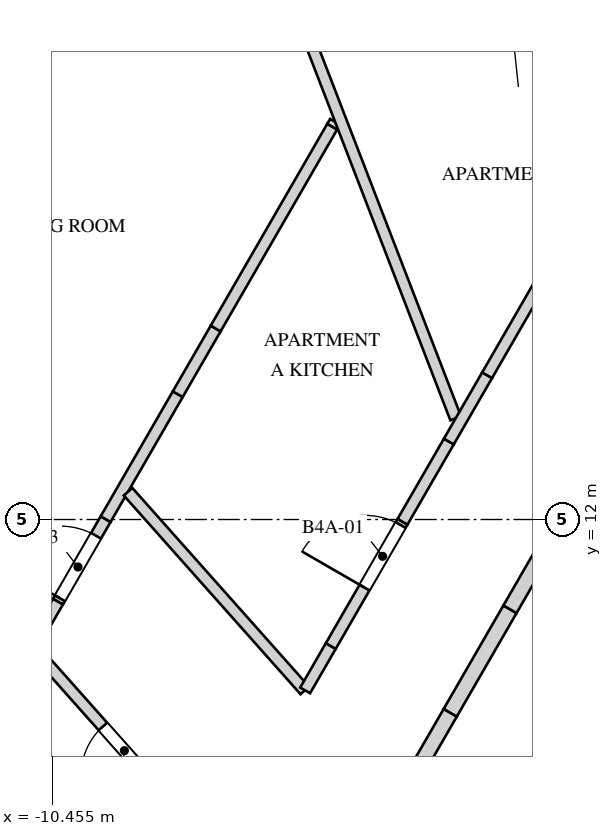
"""IFC4 building model, lengths in metres.
Left out: names, types, materials, properties, quantities, classifications, styles, units other than length and angle.
Written with IfcOpenShell. Run it as: python <this file> out.ifc"""

import sys

from ifc_helpers import new_model, si_unit, direction, frame, frame_2d, origin, place, context, subcontext, project, spatial, polyline, rectangle, outline, extrude, element, fill, save


model = new_model("IFC4")
c1 = context("Model", 3, precision=1e-05, world=origin(), true_north=direction((0.0, 1.0)))
c2 = subcontext(c1, "Body", "Model", "MODEL_VIEW")
j1 = project(units=[si_unit("LENGTHUNIT", "METRE"), si_unit("PLANEANGLEUNIT", "RADIAN")], contexts=[c1])
p1 = place(None, origin())
s1 = spatial("IfcSite", under=j1, at=p1, CompositionType="ELEMENT")
p2 = place(p1, origin())
s2 = spatial("IfcBuilding", under=s1, at=p2, CompositionType="ELEMENT")
p3 = place(p2, frame((0.0, 0.0, 162.8)))
s3 = spatial("IfcBuildingStorey", under=s2, at=p3, CompositionType="ELEMENT", Elevation=162.8)
p4 = place(p3, frame((-1.198, 10.575, 0.0), z_axis=(0.0, 0.0, 1.0), x_axis=(-0.499995289315, -0.866028123483, 0.0)))
e1 = element("IfcWall", 1, at=p4, inside=s3, PredefinedType="SHEAR", context=c2, shape_type="SweptSolid", body=[
    extrude(rectangle(XDim=17.118, YDim=0.85, at=frame_2d((8.559, 0.0))), origin(), (0.0, 0.0, 1.0), 4.0),
])
p5 = place(p4, frame((6.764, 0.0, 0.0)))
e2 = element("IfcOpeningElement", 2, at=p5, cuts=e1, PredefinedType="OPENING", context=c2, shape_type="SweptSolid", body=[
    extrude(rectangle(XDim=1.0, YDim=2.4, at=frame_2d((0.5, 1.2))), frame((0.0, 0.435, 0.0), z_axis=(0.0, -1.0, 0.0), x_axis=(1.0, 0.0, 0.0)), (0.0, 0.0, 1.0), 0.87),
])
p6 = place(p4, frame((14.742, 0.0, 0.0)))
e3 = element("IfcOpeningElement", 3, at=p6, cuts=e1, PredefinedType="OPENING", context=c2, shape_type="SweptSolid", body=[
    extrude(rectangle(XDim=0.8, YDim=2.1, at=frame_2d((0.4, 1.05))), frame((0.0, 0.435, 0.0), z_axis=(0.0, -1.0, 0.0), x_axis=(1.0, 0.0, 0.0)), (0.0, 0.0, 1.0), 0.87),
])
p7 = place(p3, frame((-11.235, 9.44, 0.0), z_axis=(0.0, 0.0, 1.0), x_axis=(0.499977863513, 0.866038183914, 0.0)))
e4 = element("IfcWall", 4, at=p7, inside=s3, PredefinedType="PARTITIONING", context=c2, shape_type="SweptSolid", body=[
    extrude(rectangle(XDim=1.71, YDim=0.15, at=frame_2d((0.855, 0.0))), origin(), (0.0, 0.0, 1.0), 3.65),
])
p8 = place(p3, frame((-10.38, 10.921, 0.0), z_axis=(0.0, 0.0, 1.0), x_axis=(0.499998165157, 0.866026463129, 0.0)))
e5 = element("IfcWall", 5, at=p8, inside=s3, PredefinedType="PARTITIONING", context=c2, shape_type="SweptSolid", body=[
    extrude(outline(polyline([(0.0, 0.0), (1.252, 0.0), (1.252, 2.55), (0.325, 2.55), (0.325, 3.65), (0.0, 3.65), (0.0, 0.0)])), frame((0.0, 0.075, 0.0), z_axis=(0.0, -1.0, 0.0), x_axis=(1.0, 0.0, 0.0)), (0.0, 0.0, 1.0), 0.15),
])
p9 = place(p8, frame((0.05, 0.0, 0.0)))
e6 = element("IfcOpeningElement", 6, at=p9, cuts=e5, PredefinedType="OPENING", context=c2, shape_type="SweptSolid", body=[
    extrude(rectangle(XDim=0.95, YDim=2.4, at=frame_2d((0.475, 1.2))), frame((0.0, 0.085, 0.0), z_axis=(0.0, -1.0, 0.0), x_axis=(1.0, 0.0, 0.0)), (0.0, 0.0, 1.0), 0.17),
])
p10 = place(p3, frame((-9.754, 12.005, 0.0), z_axis=(0.0, 0.0, 1.0), x_axis=(0.499971120268, 0.866042076863, 0.0)))
e7 = element("IfcWall", 7, at=p10, inside=s3, PredefinedType="PARTITIONING", context=c2, shape_type="SweptSolid", body=[
    extrude(rectangle(XDim=1.898, YDim=0.15, at=frame_2d((0.949, 0.0))), origin(), (0.0, 0.0, 1.0), 3.65),
])
p11 = place(p3, frame((-8.805, 13.649, 0.0), z_axis=(0.0, 0.0, 1.0), x_axis=(0.499955472713, 0.866051110099, 0.0)))
e8 = element("IfcWall", 8, at=p11, inside=s3, PredefinedType="PARTITIONING", context=c2, shape_type="SweptSolid", body=[
    extrude(rectangle(XDim=0.998, YDim=0.15, at=frame_2d((0.499, 0.0))), origin(), (0.0, 0.0, 1.0), 2.55),
])
p12 = place(p3, frame((-8.307, 14.513, 0.0), z_axis=(0.0, 0.0, 1.0), x_axis=(0.500034855457, 0.866005279042, 0.0)))
e9 = element("IfcWall", 9, at=p12, inside=s3, PredefinedType="PARTITIONING", context=c2, shape_type="SweptSolid", body=[
    extrude(rectangle(XDim=3.067, YDim=0.15, at=frame_2d((1.533, 0.0))), origin(), (0.0, 0.0, 1.0), 3.65),
])
p13 = place(p3, frame((-6.773, 17.168, 0.0), z_axis=(0.0, 0.0, 1.0), x_axis=(0.501423782413, 0.865201820635, 0.0)))
e10 = element("IfcWall", 10, at=p13, inside=s3, PredefinedType="PARTITIONING", context=c2, shape_type="SweptSolid", body=[
    extrude(rectangle(XDim=0.074, YDim=0.15, at=frame_2d((0.037, 0.0))), origin(), (0.0, 0.0, 1.0), 2.75),
])
p14 = place(p3, frame((-9.459, 12.366, 0.0), z_axis=(0.0, 0.0, 1.0), x_axis=(0.664589031093, -0.747209087037, 0.0)))
e11 = element("IfcWall", 11, at=p14, inside=s3, PredefinedType="PARTITIONING", context=c2, shape_type="SweptSolid", body=[
    extrude(rectangle(XDim=3.499, YDim=0.15, at=frame_2d((1.75, 0.0))), origin(), (0.0, 0.0, 1.0), 3.65),
])
p15 = place(p3, frame((-8.742, 7.109, 0.0), z_axis=(0.0, 0.0, 1.0), x_axis=(-0.775864969599, 0.630899000593, 0.0)))
e12 = element("IfcWall", 12, at=p15, inside=s3, PredefinedType="PARTITIONING", context=c2, shape_type="SweptSolid", body=[
    extrude(rectangle(XDim=11.548, YDim=0.15, at=frame_2d((5.774, 0.0))), origin(), (0.0, 0.0, 1.0), 2.55),
])
p16 = place(p3, frame((-8.344, 7.651, 0.0), z_axis=(0.0, 0.0, 1.0), x_axis=(-0.664580231794, 0.747216913292, 0.0)))
e13 = element("IfcWall", 13, at=p16, inside=s3, PredefinedType="PARTITIONING", context=c2, shape_type="SweptSolid", body=[
    extrude(rectangle(XDim=3.501, YDim=0.15, at=frame_2d((1.75, 0.0))), origin(), (0.0, 0.0, 1.0), 3.65),
])
p17 = place(p16, frame((1.325, 0.0, 0.0)))
e14 = element("IfcOpeningElement", 14, at=p17, cuts=e13, PredefinedType="OPENING", context=c2, shape_type="SweptSolid", body=[
    extrude(rectangle(XDim=0.85, YDim=2.4, at=frame_2d((0.425, 1.2))), frame((0.0, 0.085, 0.0), z_axis=(0.0, -1.0, 0.0), x_axis=(1.0, 0.0, 0.0)), (0.0, 0.0, 1.0), 0.17),
])
p18 = place(p3, frame((-8.22, 21.283, 0.0), z_axis=(0.0, 0.0, 1.0), x_axis=(0.360262770677, -0.932850864857, 0.0)))
e15 = element("IfcWall", 15, at=p18, inside=s3, PredefinedType="PARTITIONING", context=c2, shape_type="SweptSolid", body=[
    extrude(rectangle(XDim=8.524, YDim=0.15, at=frame_2d((4.262, 0.0))), origin(), (0.0, 0.0, 1.0), 2.75),
])
p19 = place(p3, frame((-7.129, 9.752, 0.0), z_axis=(0.0, 0.0, 1.0), x_axis=(0.500036104519, 0.866004557827, 0.0)))
e16 = element("IfcWall", 16, at=p19, inside=s3, PredefinedType="PARTITIONING", context=c2, shape_type="SweptSolid", body=[
    extrude(rectangle(XDim=0.674, YDim=0.15, at=frame_2d((0.337, 0.0))), origin(), (0.0, 0.0, 1.0), 3.65),
])
p20 = place(p3, frame((-6.792, 10.335, 0.0), z_axis=(0.0, 0.0, 1.0), x_axis=(0.499991068497, 0.866030560329, 0.0)))
e17 = element("IfcWall", 17, at=p20, inside=s3, PredefinedType="PARTITIONING", context=c2, shape_type="SweptSolid", body=[
    extrude(outline(polyline([(0.0, 0.0), (1.888, 0.0), (1.888, 3.65), (0.998, 3.65), (0.998, 2.55), (0.0, 2.55), (0.0, 0.0)])), frame((0.0, 0.075, 0.0), z_axis=(0.0, -1.0, 0.0), x_axis=(1.0, 0.0, 0.0)), (0.0, 0.0, 1.0), 0.15),
])
p21 = place(p20, frame((0.888, 0.0, 0.0)))
e18 = element("IfcOpeningElement", 18, at=p21, cuts=e17, PredefinedType="OPENING", context=c2, shape_type="SweptSolid", body=[
    extrude(rectangle(XDim=0.95, YDim=2.4, at=frame_2d((0.475, 1.2))), frame((0.0, 0.085, 0.0), z_axis=(0.0, -1.0, 0.0), x_axis=(1.0, 0.0, 0.0)), (0.0, 0.0, 1.0), 0.17),
])
p22 = place(p3, frame((-5.848, 11.971, 0.0), z_axis=(0.0, 0.0, 1.0), x_axis=(0.500017246033, 0.866015446554, 0.0)))
e19 = element("IfcWall", 19, at=p22, inside=s3, PredefinedType="PARTITIONING", context=c2, shape_type="SweptSolid", body=[
    extrude(rectangle(XDim=1.219, YDim=0.15, at=frame_2d((0.609, 0.0))), origin(), (0.0, 0.0, 1.0), 3.65),
])
p23 = place(p3, frame((-5.239, 13.026, 0.0), z_axis=(0.0, 0.0, 1.0), x_axis=(0.499946326053, 0.866056390234, 0.0)))
e20 = element("IfcWall", 20, at=p23, inside=s3, PredefinedType="PARTITIONING", context=c2, shape_type="SweptSolid", body=[
    extrude(rectangle(XDim=1.007, YDim=0.15, at=frame_2d((0.503, 0.0))), origin(), (0.0, 0.0, 1.0), 2.75),
])
p24 = place(p3, frame((-4.735, 13.898, 0.0), z_axis=(0.0, 0.0, 1.0), x_axis=(0.499983569942, 0.866034889475, 0.0)))
e21 = element("IfcWall", 21, at=p24, inside=s3, PredefinedType="PARTITIONING", context=c2, shape_type="SweptSolid", body=[
    extrude(rectangle(XDim=1.619, YDim=0.15, at=frame_2d((0.809, 0.0))), origin(), (0.0, 0.0, 1.0), 3.65),
])
p25 = place(p3, frame((-5.734, 8.569, 0.0), z_axis=(0.0, 0.0, 1.0), x_axis=(0.500079402778, 0.865979555715, 0.0)))
e22 = element("IfcWall", 22, at=p25, inside=s3, PredefinedType="SOLIDWALL", context=c2, shape_type="SweptSolid", body=[
    extrude(rectangle(XDim=1.026, YDim=0.2, at=frame_2d((0.513, 0.0))), origin(), (0.0, 0.0, 1.0), 2.55),
])
p26 = place(p3, frame((-5.22, 9.458, 0.0), z_axis=(0.0, 0.0, 1.0), x_axis=(0.500031717574, 0.86600709086, 0.0)))
e23 = element("IfcWall", 23, at=p26, inside=s3, PredefinedType="SOLIDWALL", context=c2, shape_type="SweptSolid", body=[
    extrude(rectangle(XDim=1.572, YDim=0.2, at=frame_2d((0.786, 0.0))), origin(), (0.0, 0.0, 1.0), 3.65),
])
p27 = place(p3, frame((-4.435, 10.819, 0.0), z_axis=(0.0, 0.0, 1.0), x_axis=(0.500054530113, 0.86599391852, 0.0)))
e24 = element("IfcWall", 24, at=p27, inside=s3, PredefinedType="SOLIDWALL", context=c2, shape_type="SweptSolid", body=[
    extrude(rectangle(XDim=1.04, YDim=0.2, at=frame_2d((0.52, 0.0))), origin(), (0.0, 0.0, 1.0), 2.75),
])
p28 = place(p21, origin())
e25 = element("IfcDoor", 25, at=p28, inside=s3, OperationType="SINGLE_SWING_LEFT", PredefinedType="DOOR", context=c2, shape_type="SweptSolid", body=[
    extrude(rectangle(XDim=0.95, YDim=2.4, at=frame_2d((0.475, 1.2))), frame((0.0, 0.025, 0.0), z_axis=(0.0, -1.0, 0.0), x_axis=(1.0, 0.0, 0.0)), (0.0, 0.0, 1.0), 0.05),
])
fill(e18, e25)
p29 = place(p17, origin())
e26 = element("IfcDoor", 26, at=p29, inside=s3, OperationType="SINGLE_SWING_RIGHT", PredefinedType="DOOR", context=c2, shape_type="SweptSolid", body=[
    extrude(rectangle(XDim=0.85, YDim=2.4, at=frame_2d((0.425, 1.2))), frame((0.0, 0.025, 0.0), z_axis=(0.0, -1.0, 0.0), x_axis=(1.0, 0.0, 0.0)), (0.0, 0.0, 1.0), 0.05),
])
fill(e14, e26)
p30 = place(p9, origin())
e27 = element("IfcDoor", 27, at=p30, inside=s3, OperationType="SINGLE_SWING_LEFT", PredefinedType="DOOR", context=c2, shape_type="SweptSolid", body=[
    extrude(rectangle(XDim=0.95, YDim=2.4, at=frame_2d((0.475, 1.2))), frame((0.0, 0.025, 0.0), z_axis=(0.0, -1.0, 0.0), x_axis=(1.0, 0.0, 0.0)), (0.0, 0.0, 1.0), 0.05),
])
fill(e6, e27)
save(model, sys.argv[1])
